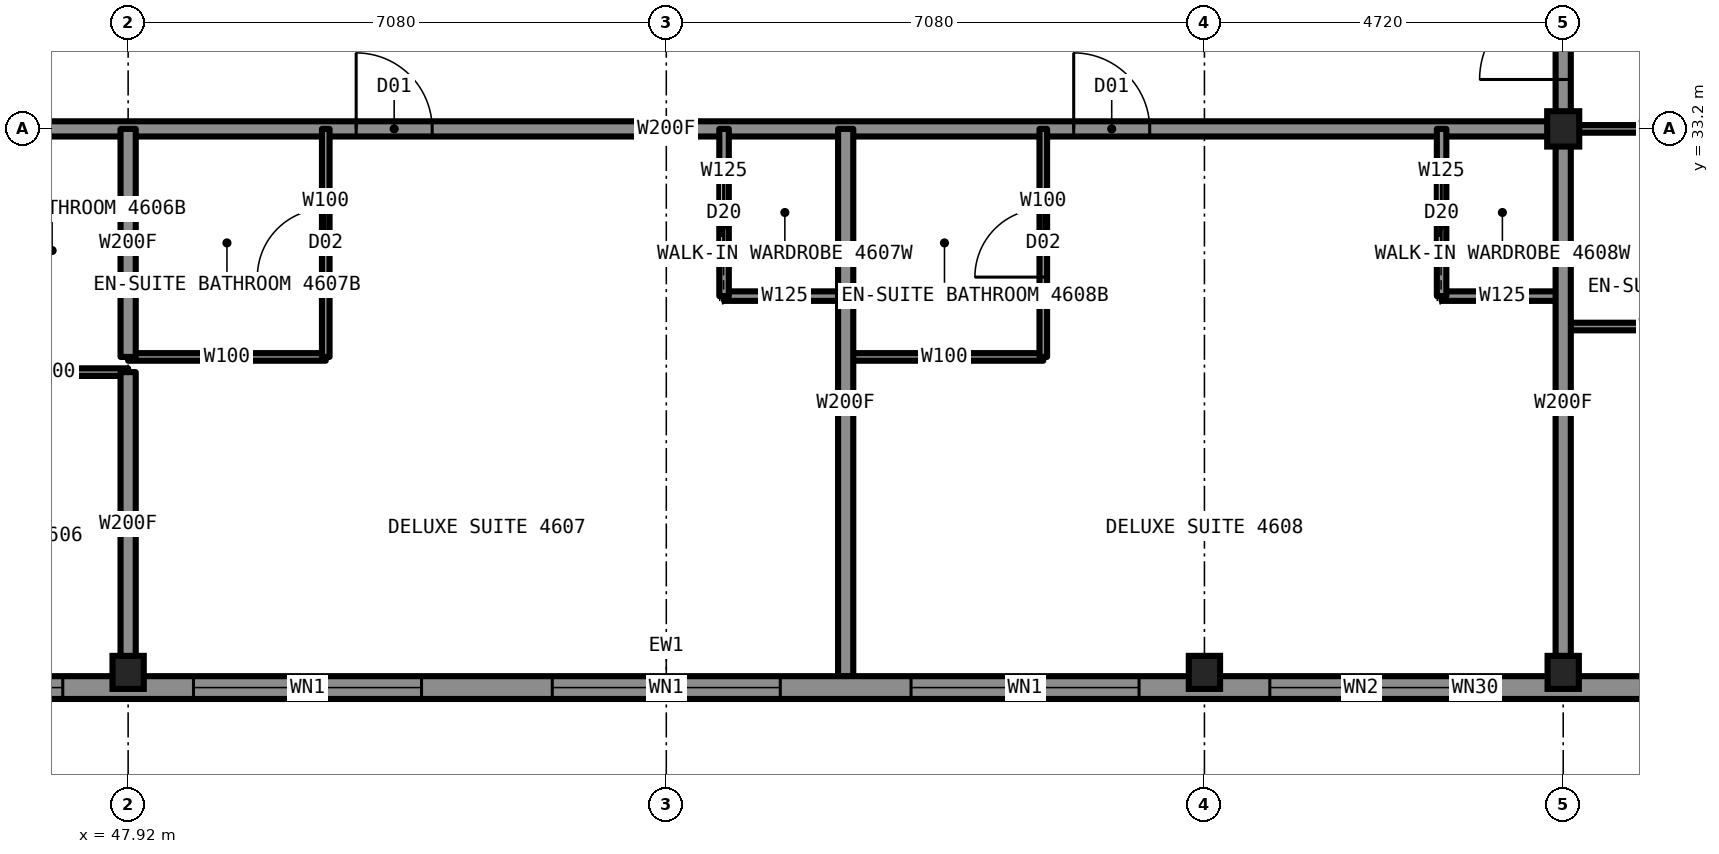
"""IFC4 building model, lengths in metres.
Left out: names, types, materials, properties, quantities, classifications, styles, units other than length and angle.
Written with IfcOpenShell. Run it as: python <this file> out.ifc"""

import sys

from ifc_helpers import new_model, si_unit, direction, frame, frame_2d, origin, origin_2d, place, context, subcontext, project, spatial, rectangle, i_section, extrude, element, fill, save


model = new_model("IFC4")
c1 = context("Model", 3, precision=1e-05, world=origin(), true_north=direction((0.0, 1.0)))
c2 = subcontext(c1, "Body", "Model", "MODEL_VIEW")
j1 = project(units=[si_unit("LENGTHUNIT", "METRE"), si_unit("PLANEANGLEUNIT", "RADIAN")], contexts=[c1])
p1 = place(None, origin())
s1 = spatial("IfcSite", under=j1, at=p1, CompositionType="ELEMENT")
p2 = place(p1, origin())
s2 = spatial("IfcBuilding", under=s1, at=p2, CompositionType="ELEMENT")
p3 = place(p2, frame((0.0, 0.0, 172.3)))
s3 = spatial("IfcBuildingStorey", under=s2, at=p3, CompositionType="ELEMENT", Elevation=172.3)
for number, where, z_axis, x_axis in (
    (1, (47.92, 26.05, 0.0), (0.0, 0.0, 1.0), (1.0, 0.0, 0.0)),
    (2, (62.08, 26.05, 0.0), (0.0, 0.0, 1.0), (1.0, 0.0, 0.0)),
    (3, (66.8, 26.05, 0.0), (0.0, 0.0, 1.0), (1.0, 0.0, 0.0)),
):
    element("IfcColumn", number, at=place(p3, frame(where, z_axis=z_axis, x_axis=x_axis)), inside=s3, PredefinedType="COLUMN", context=c2, shape_type="SweptSolid", body=[
        extrude(i_section(OverallWidth=0.411, OverallDepth=0.434, WebThickness=0.036, FlangeThickness=0.057, at=origin_2d()), origin(), (0.0, 0.0, 1.0), 3.5),
    ])
p4 = place(p3, frame((66.8, 33.2, 0.0), z_axis=(0.0, 0.0, 1.0), x_axis=(1.0, 0.0, 0.0)))
e4 = element("IfcColumn", 4, at=p4, inside=s3, PredefinedType="COLUMN", context=c2, shape_type="SweptSolid", body=[
    extrude(i_section(OverallWidth=0.422, OverallDepth=0.465, WebThickness=0.045, FlangeThickness=0.073, at=origin_2d()), origin(), (0.0, 0.0, 1.0), 3.5),
])
p5 = place(p3, frame((66.8, 33.2, 0.0), z_axis=(0.0, 0.0, 1.0), x_axis=(1.0, 0.0, 0.0)))
e5 = element("IfcWall", 5, at=p5, inside=s3, PredefinedType="PARTITIONING", context=c2, shape_type="SweptSolid", body=[
    extrude(rectangle(XDim=2.6, YDim=0.1, at=frame_2d((1.3, 0.0))), origin(), (0.0, 0.0, 1.0), 2.573),
])
p6 = place(p3, frame((43.2, 33.2, 0.0), z_axis=(0.0, 0.0, 1.0), x_axis=(1.0, 0.0, 0.0)))
e6 = element("IfcWall", 6, at=p6, inside=s3, PredefinedType="PARTITIONING", context=c2, shape_type="SweptSolid", body=[
    extrude(rectangle(XDim=23.6, YDim=0.2, at=frame_2d((11.8, 0.0))), origin(), (0.0, 0.0, 1.0), 3.33),
])
p7 = place(p6, frame((1.46, 0.0, 0.0)))
e7 = element("IfcOpeningElement", 7, at=p7, cuts=e6, PredefinedType="OPENING", context=c2, shape_type="SweptSolid", body=[
    extrude(rectangle(XDim=1.0, YDim=2.2, at=frame_2d((0.5, 1.1))), frame((0.0, 0.11, 0.0), z_axis=(0.0, -1.0, 0.0), x_axis=(1.0, 0.0, 0.0)), (0.0, 0.0, 1.0), 0.22),
])
p8 = place(p6, frame((7.72, 0.0, 0.0)))
e8 = element("IfcOpeningElement", 8, at=p8, cuts=e6, PredefinedType="OPENING", context=c2, shape_type="SweptSolid", body=[
    extrude(rectangle(XDim=1.0, YDim=2.2, at=frame_2d((0.5, 1.1))), frame((0.0, 0.11, 0.0), z_axis=(0.0, -1.0, 0.0), x_axis=(1.0, 0.0, 0.0)), (0.0, 0.0, 1.0), 0.22),
])
p9 = place(p6, frame((17.16, 0.0, 0.0)))
e9 = element("IfcOpeningElement", 9, at=p9, cuts=e6, PredefinedType="OPENING", context=c2, shape_type="SweptSolid", body=[
    extrude(rectangle(XDim=1.0, YDim=2.2, at=frame_2d((0.5, 1.1))), frame((0.0, 0.11, 0.0), z_axis=(0.0, -1.0, 0.0), x_axis=(1.0, 0.0, 0.0)), (0.0, 0.0, 1.0), 0.22),
])
for number, where, z_axis, x_axis in (
    (10, (55.76, 31.0, 0.0), (0.0, 0.0, 1.0), (1.0, 0.0, 0.0)),
    (11, (65.2, 31.0, 0.0), (0.0, 0.0, 1.0), (1.0, 0.0, 0.0)),
):
    element("IfcWall", number, at=place(p3, frame(where, z_axis=z_axis, x_axis=x_axis)), inside=s3, PredefinedType="PARTITIONING", context=c2, shape_type="SweptSolid", body=[
        extrude(rectangle(XDim=1.6, YDim=0.125, at=frame_2d((0.8, 0.0))), origin(), (0.0, 0.0, 1.0), 3.33),
    ])
p10 = place(p3, frame((66.8, 30.6, 0.0), z_axis=(0.0, 0.0, 1.0), x_axis=(1.0, 0.0, 0.0)))
e12 = element("IfcWall", 12, at=p10, inside=s3, PredefinedType="PARTITIONING", context=c2, shape_type="SweptSolid", body=[
    extrude(rectangle(XDim=2.6, YDim=0.1, at=frame_2d((1.3, 0.0))), origin(), (0.0, 0.0, 1.0), 3.33),
])
p11 = place(p3, frame((47.92, 30.2, 0.0), z_axis=(0.0, 0.0, 1.0), x_axis=(1.0, 0.0, 0.0)))
e13 = element("IfcWall", 13, at=p11, inside=s3, PredefinedType="PARTITIONING", context=c2, shape_type="SweptSolid", body=[
    extrude(rectangle(XDim=2.6, YDim=0.1, at=frame_2d((1.3, 0.0))), origin(), (0.0, 0.0, 1.0), 3.33),
])
p12 = place(p3, frame((57.36, 30.2, 0.0), z_axis=(0.0, 0.0, 1.0), x_axis=(1.0, 0.0, 0.0)))
e14 = element("IfcWall", 14, at=p12, inside=s3, PredefinedType="PARTITIONING", context=c2, shape_type="SweptSolid", body=[
    extrude(rectangle(XDim=2.6, YDim=0.1, at=frame_2d((1.3, 0.0))), origin(), (0.0, 0.0, 1.0), 3.33),
])
p13 = place(p3, frame((45.92, 30.0, 0.0), z_axis=(0.0, 0.0, 1.0), x_axis=(1.0, 0.0, 0.0)))
e15 = element("IfcWall", 15, at=p13, inside=s3, PredefinedType="PARTITIONING", context=c2, shape_type="SweptSolid", body=[
    extrude(rectangle(XDim=2.0, YDim=0.1, at=frame_2d((1.0, 0.0))), origin(), (0.0, 0.0, 1.0), 3.33),
])
p14 = place(p3, frame((50.52, 30.2, 0.0), z_axis=(0.0, 0.0, 1.0), x_axis=(0.0, 1.0, 0.0)))
e16 = element("IfcWall", 16, at=p14, inside=s3, PredefinedType="PARTITIONING", context=c2, shape_type="SweptSolid", body=[
    extrude(rectangle(XDim=3.0, YDim=0.1, at=frame_2d((1.5, 0.0))), origin(), (0.0, 0.0, 1.0), 3.33),
])
p15 = place(p14, frame((1.05, 0.0, 0.0)))
e17 = element("IfcOpeningElement", 17, at=p15, cuts=e16, PredefinedType="OPENING", context=c2, shape_type="SweptSolid", body=[
    extrude(rectangle(XDim=0.9, YDim=2.1, at=frame_2d((0.45, 1.05))), frame((0.0, 0.06, 0.0), z_axis=(0.0, -1.0, 0.0), x_axis=(1.0, 0.0, 0.0)), (0.0, 0.0, 1.0), 0.12),
])
p16 = place(p3, frame((47.92, 26.0, 0.0), z_axis=(0.0, 0.0, 1.0), x_axis=(0.0, 1.0, 0.0)))
e18 = element("IfcWall", 18, at=p16, inside=s3, PredefinedType="PARTITIONING", context=c2, shape_type="SweptSolid", body=[
    extrude(rectangle(XDim=4.0, YDim=0.2, at=frame_2d((2.0, 0.0))), origin(), (0.0, 0.0, 1.0), 2.573),
])
p17 = place(p3, frame((47.92, 30.2, 0.0), z_axis=(0.0, 0.0, 1.0), x_axis=(0.0, 1.0, 0.0)))
e19 = element("IfcWall", 19, at=p17, inside=s3, PredefinedType="PARTITIONING", context=c2, shape_type="SweptSolid", body=[
    extrude(rectangle(XDim=3.0, YDim=0.2, at=frame_2d((1.5, 0.0))), origin(), (0.0, 0.0, 1.0), 2.573),
])
p18 = place(p3, frame((55.76, 31.0, 0.0), z_axis=(0.0, 0.0, 1.0), x_axis=(0.0, 1.0, 0.0)))
e20 = element("IfcWall", 20, at=p18, inside=s3, PredefinedType="PARTITIONING", context=c2, shape_type="SweptSolid", body=[
    extrude(rectangle(XDim=2.2, YDim=0.125, at=frame_2d((1.1, 0.0))), origin(), (0.0, 0.0, 1.0), 3.33),
])
p19 = place(p18, frame((0.7, 0.0, 0.0)))
e21 = element("IfcOpeningElement", 21, at=p19, cuts=e20, PredefinedType="OPENING", context=c2, shape_type="SweptSolid", body=[
    extrude(rectangle(XDim=0.8, YDim=2.1, at=frame_2d((0.4, 1.05))), frame((0.0, 0.073, 0.0), z_axis=(0.0, -1.0, 0.0), x_axis=(1.0, 0.0, 0.0)), (0.0, 0.0, 1.0), 0.145),
])
p20 = place(p3, frame((65.2, 31.0, 0.0), z_axis=(0.0, 0.0, 1.0), x_axis=(0.0, 1.0, 0.0)))
e22 = element("IfcWall", 22, at=p20, inside=s3, PredefinedType="PARTITIONING", context=c2, shape_type="SweptSolid", body=[
    extrude(rectangle(XDim=2.2, YDim=0.125, at=frame_2d((1.1, 0.0))), origin(), (0.0, 0.0, 1.0), 3.33),
])
p21 = place(p20, frame((0.7, 0.0, 0.0)))
e23 = element("IfcOpeningElement", 23, at=p21, cuts=e22, PredefinedType="OPENING", context=c2, shape_type="SweptSolid", body=[
    extrude(rectangle(XDim=0.8, YDim=2.1, at=frame_2d((0.4, 1.05))), frame((0.0, 0.073, 0.0), z_axis=(0.0, -1.0, 0.0), x_axis=(1.0, 0.0, 0.0)), (0.0, 0.0, 1.0), 0.145),
])
p22 = place(p3, frame((66.8, 33.2, 0.0), z_axis=(0.0, 0.0, 1.0), x_axis=(0.0, 1.0, 0.0)))
e24 = element("IfcWall", 24, at=p22, inside=s3, PredefinedType="PARTITIONING", context=c2, shape_type="SweptSolid", body=[
    extrude(rectangle(XDim=23.58, YDim=0.2, at=frame_2d((11.79, 0.0))), origin(), (0.0, 0.0, 1.0), 3.33),
])
p23 = place(p22, frame((7.87, 0.0, 0.0)))
e25 = element("IfcOpeningElement", 25, at=p23, cuts=e24, PredefinedType="OPENING", context=c2, shape_type="SweptSolid", body=[
    extrude(rectangle(XDim=1.0, YDim=2.2, at=frame_2d((0.5, 1.1))), frame((0.0, 0.11, 0.0), z_axis=(0.0, -1.0, 0.0), x_axis=(1.0, 0.0, 0.0)), (0.0, 0.0, 1.0), 0.22),
])
p24 = place(p22, frame((10.9, 0.0, 0.0)))
e26 = element("IfcOpeningElement", 26, at=p24, cuts=e24, PredefinedType="OPENING", context=c2, shape_type="SweptSolid", body=[
    extrude(rectangle(XDim=1.0, YDim=2.2, at=frame_2d((0.5, 1.1))), frame((0.0, 0.11, 0.0), z_axis=(0.0, -1.0, 0.0), x_axis=(1.0, 0.0, 0.0)), (0.0, 0.0, 1.0), 0.22),
])
p25 = place(p22, frame((16.42, 0.0, 0.0)))
e27 = element("IfcOpeningElement", 27, at=p25, cuts=e24, PredefinedType="OPENING", context=c2, shape_type="SweptSolid", body=[
    extrude(rectangle(XDim=1.0, YDim=2.2, at=frame_2d((0.5, 1.1))), frame((0.0, 0.11, 0.0), z_axis=(0.0, -1.0, 0.0), x_axis=(1.0, 0.0, 0.0)), (0.0, 0.0, 1.0), 0.22),
])
p26 = place(p22, frame((22.05, 0.0, 0.0)))
e28 = element("IfcOpeningElement", 28, at=p26, cuts=e24, PredefinedType="OPENING", context=c2, shape_type="SweptSolid", body=[
    extrude(rectangle(XDim=1.1, YDim=2.2, at=frame_2d((0.55, 1.1))), frame((0.0, 0.11, 0.0), z_axis=(0.0, -1.0, 0.0), x_axis=(1.0, 0.0, 0.0)), (0.0, 0.0, 1.0), 0.22),
])
p27 = place(p22, frame((0.65, 0.0, 0.0)))
e29 = element("IfcOpeningElement", 29, at=p27, cuts=e24, PredefinedType="OPENING", context=c2, shape_type="SweptSolid", body=[
    extrude(rectangle(XDim=1.1, YDim=2.2, at=frame_2d((0.55, 1.1))), frame((0.0, 0.11, 0.0), z_axis=(0.0, -1.0, 0.0), x_axis=(1.0, 0.0, 0.0)), (0.0, 0.0, 1.0), 0.22),
])
p28 = place(p3, frame((66.8, 26.0, 0.0), z_axis=(0.0, 0.0, 1.0), x_axis=(0.0, 1.0, 0.0)))
e30 = element("IfcWall", 30, at=p28, inside=s3, PredefinedType="PARTITIONING", context=c2, shape_type="SweptSolid", body=[
    extrude(rectangle(XDim=7.2, YDim=0.2, at=frame_2d((3.6, 0.0))), origin(), (0.0, 0.0, 1.0), 2.573),
])
p29 = place(p3, frame((57.36, 26.0, 0.0), z_axis=(0.0, 0.0, 1.0), x_axis=(0.0, 1.0, 0.0)))
e31 = element("IfcWall", 31, at=p29, inside=s3, PredefinedType="PARTITIONING", context=c2, shape_type="SweptSolid", body=[
    extrude(rectangle(XDim=7.2, YDim=0.2, at=frame_2d((3.6, 0.0))), origin(), (0.0, 0.0, 1.0), 3.33),
])
p30 = place(p3, frame((59.96, 30.2, 0.0), z_axis=(0.0, 0.0, 1.0), x_axis=(0.0, 1.0, 0.0)))
e32 = element("IfcWall", 32, at=p30, inside=s3, PredefinedType="PARTITIONING", context=c2, shape_type="SweptSolid", body=[
    extrude(rectangle(XDim=3.0, YDim=0.1, at=frame_2d((1.5, 0.0))), origin(), (0.0, 0.0, 1.0), 3.33),
])
p31 = place(p30, frame((1.05, 0.0, 0.0)))
e33 = element("IfcOpeningElement", 33, at=p31, cuts=e32, PredefinedType="OPENING", context=c2, shape_type="SweptSolid", body=[
    extrude(rectangle(XDim=0.9, YDim=2.1, at=frame_2d((0.45, 1.05))), frame((0.0, 0.06, 0.0), z_axis=(0.0, -1.0, 0.0), x_axis=(1.0, 0.0, 0.0)), (0.0, 0.0, 1.0), 0.12),
])
p32 = place(p3, frame((41.2, 25.85, 0.0), z_axis=(0.0, 0.0, 1.0), x_axis=(1.0, 0.0, 0.0)))
e34 = element("IfcWall", 34, at=p32, inside=s3, PredefinedType="SOLIDWALL", context=c2, shape_type="SweptSolid", body=[
    extrude(rectangle(XDim=27.6, YDim=0.3, at=frame_2d((13.8, 0.0))), origin(), (0.0, 0.0, 1.0), 2.83),
])
p33 = place(p32, frame((3.46, 0.0, 0.3)))
e35 = element("IfcOpeningElement", 35, at=p33, cuts=e34, PredefinedType="OPENING", context=c2, shape_type="SweptSolid", body=[
    extrude(rectangle(XDim=2.4, YDim=2.0, at=frame_2d((1.2, 1.0))), frame((0.0, 0.16, 0.0), z_axis=(0.0, -1.0, 0.0), x_axis=(1.0, 0.0, 0.0)), (0.0, 0.0, 1.0), 0.32),
])
p34 = place(p32, frame((7.58, 0.0, 0.3)))
e36 = element("IfcOpeningElement", 36, at=p34, cuts=e34, PredefinedType="OPENING", context=c2, shape_type="SweptSolid", body=[
    extrude(rectangle(XDim=3.0, YDim=2.0, at=frame_2d((1.5, 1.0))), frame((0.0, 0.16, 0.0), z_axis=(0.0, -1.0, 0.0), x_axis=(1.0, 0.0, 0.0)), (0.0, 0.0, 1.0), 0.32),
])
p35 = place(p32, frame((12.3, 0.0, 0.3)))
e37 = element("IfcOpeningElement", 37, at=p35, cuts=e34, PredefinedType="OPENING", context=c2, shape_type="SweptSolid", body=[
    extrude(rectangle(XDim=3.0, YDim=2.0, at=frame_2d((1.5, 1.0))), frame((0.0, 0.16, 0.0), z_axis=(0.0, -1.0, 0.0), x_axis=(1.0, 0.0, 0.0)), (0.0, 0.0, 1.0), 0.32),
])
p36 = place(p32, frame((17.02, 0.0, 0.3)))
e38 = element("IfcOpeningElement", 38, at=p36, cuts=e34, PredefinedType="OPENING", context=c2, shape_type="SweptSolid", body=[
    extrude(rectangle(XDim=3.0, YDim=2.0, at=frame_2d((1.5, 1.0))), frame((0.0, 0.16, 0.0), z_axis=(0.0, -1.0, 0.0), x_axis=(1.0, 0.0, 0.0)), (0.0, 0.0, 1.0), 0.32),
])
p37 = place(p32, frame((21.74, 0.0, 0.3)))
e39 = element("IfcOpeningElement", 39, at=p37, cuts=e34, PredefinedType="OPENING", context=c2, shape_type="SweptSolid", body=[
    extrude(rectangle(XDim=2.4, YDim=2.0, at=frame_2d((1.2, 1.0))), frame((0.0, 0.16, 0.0), z_axis=(0.0, -1.0, 0.0), x_axis=(1.0, 0.0, 0.0)), (0.0, 0.0, 1.0), 0.32),
])
p38 = place(p32, frame((2.86, 0.0, 0.3)))
e40 = element("IfcOpeningElement", 40, at=p38, cuts=e34, PredefinedType="OPENING", context=c2, shape_type="SweptSolid", body=[
    extrude(rectangle(XDim=0.6, YDim=1.1, at=frame_2d((0.3, 0.55))), frame((0.0, 0.16, 0.0), z_axis=(0.0, -1.0, 0.0), x_axis=(1.0, 0.0, 0.0)), (0.0, 0.0, 1.0), 0.32),
])
p39 = place(p32, frame((24.14, 0.0, 0.3)))
e41 = element("IfcOpeningElement", 41, at=p39, cuts=e34, PredefinedType="OPENING", context=c2, shape_type="SweptSolid", body=[
    extrude(rectangle(XDim=0.6, YDim=1.1, at=frame_2d((0.3, 0.55))), frame((0.0, 0.16, 0.0), z_axis=(0.0, -1.0, 0.0), x_axis=(1.0, 0.0, 0.0)), (0.0, 0.0, 1.0), 0.32),
])
p40 = place(p8, origin())
e42 = element("IfcDoor", 42, at=p40, inside=s3, OperationType="SINGLE_SWING_LEFT", PredefinedType="DOOR", context=c2, shape_type="SweptSolid", body=[
    extrude(rectangle(XDim=1.0, YDim=2.2, at=frame_2d((0.5, 1.1))), frame((0.0, 0.025, 0.0), z_axis=(0.0, -1.0, 0.0), x_axis=(1.0, 0.0, 0.0)), (0.0, 0.0, 1.0), 0.05),
])
fill(e8, e42)
p41 = place(p15, origin())
e43 = element("IfcDoor", 43, at=p41, inside=s3, OperationType="SINGLE_SWING_RIGHT", PredefinedType="DOOR", context=c2, shape_type="SweptSolid", body=[
    extrude(rectangle(XDim=0.9, YDim=2.1, at=frame_2d((0.45, 1.05))), frame((0.0, 0.025, 0.0), z_axis=(0.0, -1.0, 0.0), x_axis=(1.0, 0.0, 0.0)), (0.0, 0.0, 1.0), 0.05),
])
fill(e17, e43)
p42 = place(p19, origin())
e44 = element("IfcDoor", 44, at=p42, inside=s3, OperationType="SLIDING_TO_LEFT", PredefinedType="DOOR", context=c2, shape_type="SweptSolid", body=[
    extrude(rectangle(XDim=0.8, YDim=2.1, at=frame_2d((0.4, 1.05))), frame((0.0, 0.025, 0.0), z_axis=(0.0, -1.0, 0.0), x_axis=(1.0, 0.0, 0.0)), (0.0, 0.0, 1.0), 0.05),
])
fill(e21, e44)
p43 = place(p9, origin())
e45 = element("IfcDoor", 45, at=p43, inside=s3, OperationType="SINGLE_SWING_LEFT", PredefinedType="DOOR", context=c2, shape_type="SweptSolid", body=[
    extrude(rectangle(XDim=1.0, YDim=2.2, at=frame_2d((0.5, 1.1))), frame((0.0, 0.025, 0.0), z_axis=(0.0, -1.0, 0.0), x_axis=(1.0, 0.0, 0.0)), (0.0, 0.0, 1.0), 0.05),
])
fill(e9, e45)
p44 = place(p31, origin())
e46 = element("IfcDoor", 46, at=p44, inside=s3, OperationType="SINGLE_SWING_RIGHT", PredefinedType="DOOR", context=c2, shape_type="SweptSolid", body=[
    extrude(rectangle(XDim=0.9, YDim=2.1, at=frame_2d((0.45, 1.05))), frame((0.0, 0.025, 0.0), z_axis=(0.0, -1.0, 0.0), x_axis=(1.0, 0.0, 0.0)), (0.0, 0.0, 1.0), 0.05),
])
fill(e33, e46)
p45 = place(p21, origin())
e47 = element("IfcDoor", 47, at=p45, inside=s3, OperationType="SLIDING_TO_LEFT", PredefinedType="DOOR", context=c2, shape_type="SweptSolid", body=[
    extrude(rectangle(XDim=0.8, YDim=2.1, at=frame_2d((0.4, 1.05))), frame((0.0, 0.025, 0.0), z_axis=(0.0, -1.0, 0.0), x_axis=(1.0, 0.0, 0.0)), (0.0, 0.0, 1.0), 0.05),
])
fill(e23, e47)
p46 = place(p27, origin())
e48 = element("IfcDoor", 48, at=p46, inside=s3, OperationType="SINGLE_SWING_LEFT", PredefinedType="DOOR", context=c2, shape_type="SweptSolid", body=[
    extrude(rectangle(XDim=1.1, YDim=2.2, at=frame_2d((0.55, 1.1))), frame((0.0, 0.025, 0.0), z_axis=(0.0, -1.0, 0.0), x_axis=(1.0, 0.0, 0.0)), (0.0, 0.0, 1.0), 0.05),
])
fill(e29, e48)
p47 = place(p33, origin())
e49 = element("IfcWindow", 49, at=p47, inside=s3, PartitioningType="SINGLE_PANEL", PredefinedType="WINDOW", context=c2, shape_type="SweptSolid", body=[
    extrude(rectangle(XDim=2.4, YDim=2.0, at=frame_2d((1.2, 1.0))), frame((0.0, 0.13, 0.0), z_axis=(0.0, -1.0, 0.0), x_axis=(1.0, 0.0, 0.0)), (0.0, 0.0, 1.0), 0.06),
])
fill(e35, e49)
p48 = place(p34, origin())
e50 = element("IfcWindow", 50, at=p48, inside=s3, PartitioningType="SINGLE_PANEL", PredefinedType="WINDOW", context=c2, shape_type="SweptSolid", body=[
    extrude(rectangle(XDim=3.0, YDim=2.0, at=frame_2d((1.5, 1.0))), frame((0.0, 0.13, 0.0), z_axis=(0.0, -1.0, 0.0), x_axis=(1.0, 0.0, 0.0)), (0.0, 0.0, 1.0), 0.06),
])
fill(e36, e50)
p49 = place(p35, origin())
e51 = element("IfcWindow", 51, at=p49, inside=s3, PartitioningType="SINGLE_PANEL", PredefinedType="WINDOW", context=c2, shape_type="SweptSolid", body=[
    extrude(rectangle(XDim=3.0, YDim=2.0, at=frame_2d((1.5, 1.0))), frame((0.0, 0.13, 0.0), z_axis=(0.0, -1.0, 0.0), x_axis=(1.0, 0.0, 0.0)), (0.0, 0.0, 1.0), 0.06),
])
fill(e37, e51)
p50 = place(p36, origin())
e52 = element("IfcWindow", 52, at=p50, inside=s3, PartitioningType="SINGLE_PANEL", PredefinedType="WINDOW", context=c2, shape_type="SweptSolid", body=[
    extrude(rectangle(XDim=3.0, YDim=2.0, at=frame_2d((1.5, 1.0))), frame((0.0, 0.13, 0.0), z_axis=(0.0, -1.0, 0.0), x_axis=(1.0, 0.0, 0.0)), (0.0, 0.0, 1.0), 0.06),
])
fill(e38, e52)
p51 = place(p37, origin())
e53 = element("IfcWindow", 53, at=p51, inside=s3, PartitioningType="SINGLE_PANEL", PredefinedType="WINDOW", context=c2, shape_type="SweptSolid", body=[
    extrude(rectangle(XDim=2.4, YDim=2.0, at=frame_2d((1.2, 1.0))), frame((0.0, 0.13, 0.0), z_axis=(0.0, -1.0, 0.0), x_axis=(1.0, 0.0, 0.0)), (0.0, 0.0, 1.0), 0.06),
])
fill(e39, e53)
p52 = place(p39, origin())
e54 = element("IfcWindow", 54, at=p52, inside=s3, PartitioningType="SINGLE_PANEL", PredefinedType="WINDOW", context=c2, shape_type="SweptSolid", body=[
    extrude(rectangle(XDim=0.6, YDim=1.1, at=frame_2d((0.3, 0.55))), frame((0.0, 0.13, 0.0), z_axis=(0.0, -1.0, 0.0), x_axis=(1.0, 0.0, 0.0)), (0.0, 0.0, 1.0), 0.06),
])
fill(e41, e54)
save(model, sys.argv[1])
